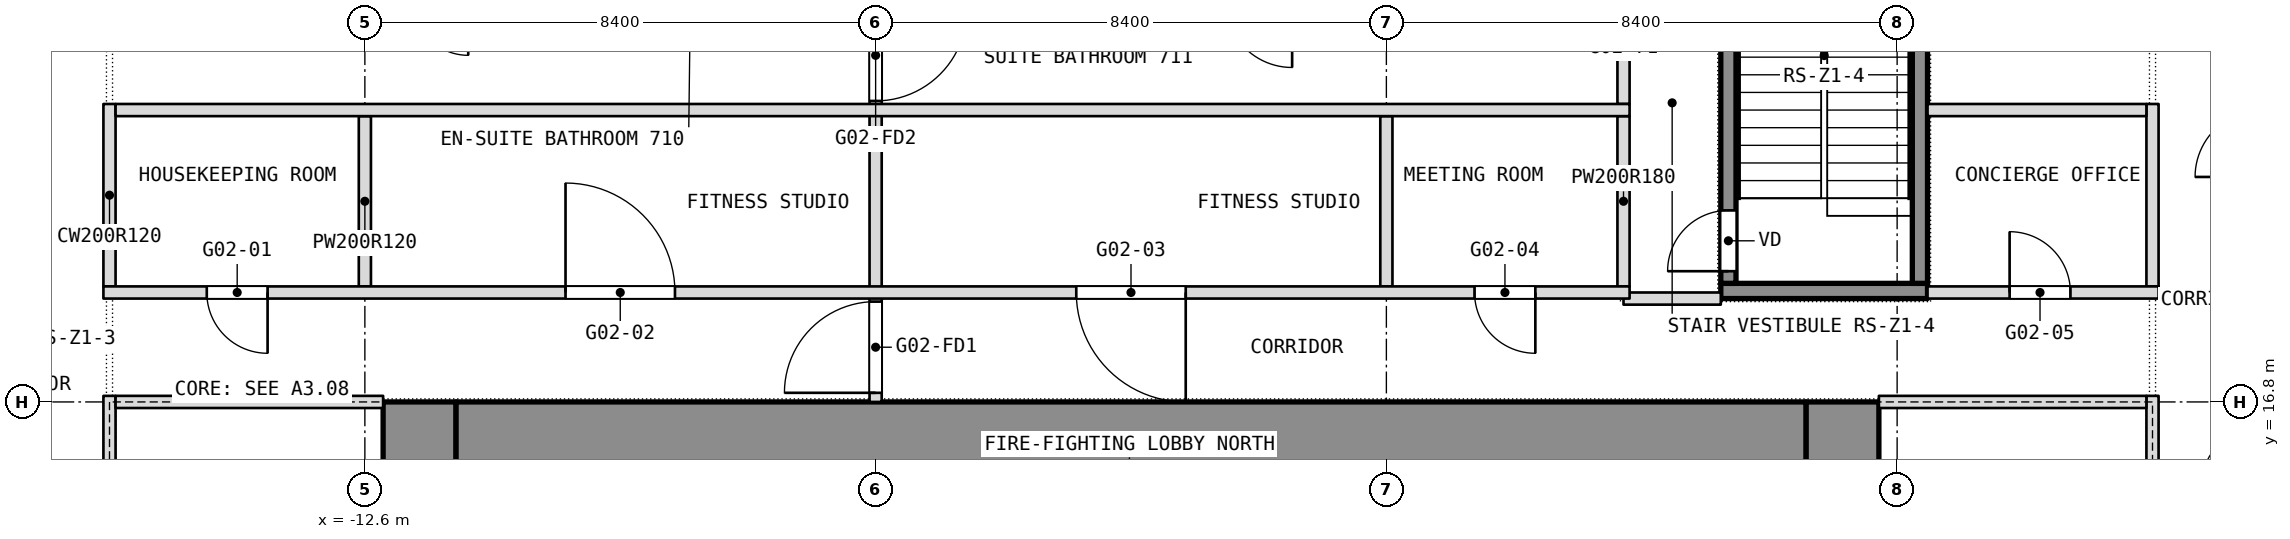
"""IFC4 building model, lengths in metres.
Left out: names, types, materials, properties, quantities, classifications, styles, units other than length and angle.
Written with IfcOpenShell. Run it as: python <this file> out.ifc"""

import sys

from ifc_helpers import new_model, si_unit, direction, frame, frame_2d, origin, place, context, subcontext, project, spatial, rectangle, extrude, element, fill, save


model = new_model("IFC4")
c1 = context("Model", 3, precision=1e-05, world=origin(), true_north=direction((0.0, 1.0)))
c2 = subcontext(c1, "Body", "Model", "MODEL_VIEW")
j1 = project(units=[si_unit("LENGTHUNIT", "METRE"), si_unit("PLANEANGLEUNIT", "RADIAN")], contexts=[c1])
p1 = place(None, origin())
s1 = spatial("IfcSite", under=j1, at=p1, CompositionType="ELEMENT")
p2 = place(p1, origin())
s2 = spatial("IfcBuilding", under=s1, at=p2, CompositionType="ELEMENT")
p3 = place(p2, frame((0.0, 0.0, 40.1)))
s3 = spatial("IfcBuildingStorey", under=s2, at=p3, CompositionType="ELEMENT", Elevation=40.1)
p4 = place(p3, frame((11.7, 0.0, 0.0), z_axis=(0.0, 0.0, 1.0), x_axis=(0.0, 1.0, 0.0)))
e1 = element("IfcWall", 1, at=p4, inside=s3, PredefinedType="SHEAR", context=c2, shape_type="SweptSolid", body=[
    extrude(rectangle(XDim=16.8, YDim=1.2, at=frame_2d((8.4, 0.0))), origin(), (0.0, 0.0, 1.0), 3.6),
])
p5 = place(p4, frame((1.688, 0.0, 0.0)))
e2 = element("IfcOpeningElement", 2, at=p5, cuts=e1, PredefinedType="OPENING", context=c2, shape_type="SweptSolid", body=[
    extrude(rectangle(XDim=0.9, YDim=2.1, at=frame_2d((0.45, 1.05))), frame((0.0, 0.6, 0.0), z_axis=(0.0, -1.0, 0.0), x_axis=(1.0, 0.0, 0.0)), (0.0, 0.0, 1.0), 1.2),
])
p6 = place(p4, frame((4.312, 0.0, 0.0)))
e3 = element("IfcOpeningElement", 3, at=p6, cuts=e1, PredefinedType="OPENING", context=c2, shape_type="SweptSolid", body=[
    extrude(rectangle(XDim=0.9, YDim=2.1, at=frame_2d((0.45, 1.05))), frame((0.0, 0.6, 0.0), z_axis=(0.0, -1.0, 0.0), x_axis=(1.0, 0.0, 0.0)), (0.0, 0.0, 1.0), 1.2),
])
p7 = place(p4, frame((6.825, 0.0, 0.0)))
e4 = element("IfcOpeningElement", 4, at=p7, cuts=e1, PredefinedType="OPENING", context=c2, shape_type="SweptSolid", body=[
    extrude(rectangle(XDim=1.2, YDim=2.1, at=frame_2d((0.6, 1.05))), frame((0.0, 0.6, 0.0), z_axis=(0.0, -1.0, 0.0), x_axis=(1.0, 0.0, 0.0)), (0.0, 0.0, 1.0), 1.2),
])
p8 = place(p4, frame((14.212, 0.0, 0.0)))
e5 = element("IfcOpeningElement", 5, at=p8, cuts=e1, PredefinedType="OPENING", context=c2, shape_type="SweptSolid", body=[
    extrude(rectangle(XDim=0.9, YDim=2.1, at=frame_2d((0.45, 1.05))), frame((0.0, 0.6, 0.0), z_axis=(0.0, -1.0, 0.0), x_axis=(1.0, 0.0, 0.0)), (0.0, 0.0, 1.0), 1.2),
])
p9 = place(p4, frame((11.587, 0.0, 0.0)))
e6 = element("IfcOpeningElement", 6, at=p9, cuts=e1, PredefinedType="OPENING", context=c2, shape_type="SweptSolid", body=[
    extrude(rectangle(XDim=0.9, YDim=2.1, at=frame_2d((0.45, 1.05))), frame((0.0, 0.6, 0.0), z_axis=(0.0, -1.0, 0.0), x_axis=(1.0, 0.0, 0.0)), (0.0, 0.0, 1.0), 1.2),
])
p10 = place(p4, frame((8.775, 0.0, 0.0)))
e7 = element("IfcOpeningElement", 7, at=p10, cuts=e1, PredefinedType="OPENING", context=c2, shape_type="SweptSolid", body=[
    extrude(rectangle(XDim=1.2, YDim=2.1, at=frame_2d((0.6, 1.05))), frame((0.0, 0.6, 0.0), z_axis=(0.0, -1.0, 0.0), x_axis=(1.0, 0.0, 0.0)), (0.0, 0.0, 1.0), 1.2),
])
p11 = place(p3, frame((-11.7, 0.0, 0.0), z_axis=(0.0, 0.0, 1.0), x_axis=(0.0, 1.0, 0.0)))
e8 = element("IfcWall", 8, at=p11, inside=s3, PredefinedType="SHEAR", context=c2, shape_type="SweptSolid", body=[
    extrude(rectangle(XDim=16.8, YDim=1.2, at=frame_2d((8.4, 0.0))), origin(), (0.0, 0.0, 1.0), 3.6),
])
p12 = place(p11, frame((2.3, 0.0, 0.0)))
e9 = element("IfcOpeningElement", 9, at=p12, cuts=e8, PredefinedType="OPENING", context=c2, shape_type="SweptSolid", body=[
    extrude(rectangle(XDim=1.1, YDim=2.1, at=frame_2d((0.55, 1.05))), frame((0.0, 0.6, 0.0), z_axis=(0.0, -1.0, 0.0), x_axis=(1.0, 0.0, 0.0)), (0.0, 0.0, 1.0), 1.2),
])
p13 = place(p11, frame((4.85, 0.0, 0.0)))
e10 = element("IfcOpeningElement", 10, at=p13, cuts=e8, PredefinedType="OPENING", context=c2, shape_type="SweptSolid", body=[
    extrude(rectangle(XDim=1.1, YDim=2.1, at=frame_2d((0.55, 1.05))), frame((0.0, 0.6, 0.0), z_axis=(0.0, -1.0, 0.0), x_axis=(1.0, 0.0, 0.0)), (0.0, 0.0, 1.0), 1.2),
])
p14 = place(p11, frame((6.825, 0.0, 0.0)))
e11 = element("IfcOpeningElement", 11, at=p14, cuts=e8, PredefinedType="OPENING", context=c2, shape_type="SweptSolid", body=[
    extrude(rectangle(XDim=1.2, YDim=2.1, at=frame_2d((0.6, 1.05))), frame((0.0, 0.6, 0.0), z_axis=(0.0, -1.0, 0.0), x_axis=(1.0, 0.0, 0.0)), (0.0, 0.0, 1.0), 1.2),
])
p15 = place(p11, frame((13.4, 0.0, 0.0)))
e12 = element("IfcOpeningElement", 12, at=p15, cuts=e8, PredefinedType="OPENING", context=c2, shape_type="SweptSolid", body=[
    extrude(rectangle(XDim=1.1, YDim=2.1, at=frame_2d((0.55, 1.05))), frame((0.0, 0.6, 0.0), z_axis=(0.0, -1.0, 0.0), x_axis=(1.0, 0.0, 0.0)), (0.0, 0.0, 1.0), 1.2),
])
p16 = place(p11, frame((10.85, 0.0, 0.0)))
e13 = element("IfcOpeningElement", 13, at=p16, cuts=e8, PredefinedType="OPENING", context=c2, shape_type="SweptSolid", body=[
    extrude(rectangle(XDim=1.1, YDim=2.1, at=frame_2d((0.55, 1.05))), frame((0.0, 0.6, 0.0), z_axis=(0.0, -1.0, 0.0), x_axis=(1.0, 0.0, 0.0)), (0.0, 0.0, 1.0), 1.2),
])
p17 = place(p11, frame((8.775, 0.0, 0.0)))
e14 = element("IfcOpeningElement", 14, at=p17, cuts=e8, PredefinedType="OPENING", context=c2, shape_type="SweptSolid", body=[
    extrude(rectangle(XDim=1.2, YDim=2.1, at=frame_2d((0.6, 1.05))), frame((0.0, 0.6, 0.0), z_axis=(0.0, -1.0, 0.0), x_axis=(1.0, 0.0, 0.0)), (0.0, 0.0, 1.0), 1.2),
])
p18 = place(p3, frame((-11.1, 16.2, 0.0), z_axis=(0.0, 0.0, 1.0), x_axis=(1.0, 0.0, 0.0)))
e15 = element("IfcWall", 15, at=p18, inside=s3, PredefinedType="SHEAR", context=c2, shape_type="SweptSolid", body=[
    extrude(rectangle(XDim=22.2, YDim=1.2, at=frame_2d((11.1, 0.0))), origin(), (0.0, 0.0, 1.0), 3.6),
])
p19 = place(p3, frame((16.8, 18.7, 0.0), z_axis=(0.0, 0.0, 1.0), x_axis=(0.0, 1.0, 0.0)))
e16 = element("IfcWall", 16, at=p19, inside=s3, PredefinedType="PARTITIONING", context=c2, shape_type="SweptSolid", body=[
    extrude(rectangle(XDim=3.0, YDim=0.2, at=frame_2d((1.5, 0.0))), origin(), (0.0, 0.0, 1.0), 3.34),
])
p20 = place(p3, frame((8.1, 18.7, 0.0), z_axis=(0.0, 0.0, 1.0), x_axis=(0.0, 1.0, 0.0)))
e17 = element("IfcWall", 17, at=p20, inside=s3, PredefinedType="PARTITIONING", context=c2, shape_type="SweptSolid", body=[
    extrude(rectangle(XDim=2.8, YDim=0.2, at=frame_2d((1.4, 0.0))), origin(), (0.0, 0.0, 1.0), 3.34),
])
p21 = place(p3, frame((8.1, 21.7, 0.0), z_axis=(0.0, 0.0, 1.0), x_axis=(0.0, 1.0, 0.0)))
e18 = element("IfcWall", 18, at=p21, inside=s3, PredefinedType="PARTITIONING", context=c2, shape_type="SweptSolid", body=[
    extrude(rectangle(XDim=2.9, YDim=0.2, at=frame_2d((1.45, 0.0))), origin(), (0.0, 0.0, 1.0), 3.34),
])
p22 = place(p21, frame((1.85, 0.0, 0.0)))
e19 = element("IfcOpeningElement", 19, at=p22, cuts=e18, PredefinedType="OPENING", context=c2, shape_type="SweptSolid", body=[
    extrude(rectangle(XDim=0.9, YDim=2.1, at=frame_2d((0.45, 1.05))), frame((0.0, 0.1, 0.0), z_axis=(0.0, -1.0, 0.0), x_axis=(1.0, 0.0, 0.0)), (0.0, 0.0, 1.0), 0.2),
])
p23 = place(p3, frame((4.2, 18.7, 0.0), z_axis=(0.0, 0.0, 1.0), x_axis=(0.0, 1.0, 0.0)))
e20 = element("IfcWall", 20, at=p23, inside=s3, PredefinedType="PARTITIONING", context=c2, shape_type="SweptSolid", body=[
    extrude(rectangle(XDim=2.8, YDim=0.2, at=frame_2d((1.4, 0.0))), origin(), (0.0, 0.0, 1.0), 3.34),
])
p24 = place(p3, frame((-4.2, 16.8, 0.0), z_axis=(0.0, 0.0, 1.0), x_axis=(0.0, 1.0, 0.0)))
e21 = element("IfcWall", 21, at=p24, inside=s3, PredefinedType="PARTITIONING", context=c2, shape_type="SweptSolid", body=[
    extrude(rectangle(XDim=6.7, YDim=0.2, at=frame_2d((3.35, 0.0))), origin(), (0.0, 0.0, 1.0), 3.34),
])
p25 = place(p24, frame((0.15, 0.0, 0.0)))
e22 = element("IfcOpeningElement", 22, at=p25, cuts=e21, PredefinedType="OPENING", context=c2, shape_type="SweptSolid", body=[
    extrude(rectangle(XDim=1.5, YDim=2.1, at=frame_2d((0.75, 1.05))), frame((0.0, 0.1, 0.0), z_axis=(0.0, -1.0, 0.0), x_axis=(1.0, 0.0, 0.0)), (0.0, 0.0, 1.0), 0.2),
])
p26 = place(p24, frame((4.95, 0.0, 0.0)))
e23 = element("IfcOpeningElement", 23, at=p26, cuts=e21, PredefinedType="OPENING", context=c2, shape_type="SweptSolid", body=[
    extrude(rectangle(XDim=1.5, YDim=2.1, at=frame_2d((0.75, 1.05))), frame((0.0, 0.1, 0.0), z_axis=(0.0, -1.0, 0.0), x_axis=(1.0, 0.0, 0.0)), (0.0, 0.0, 1.0), 0.2),
])
p27 = place(p3, frame((-12.6, 18.7, 0.0), z_axis=(0.0, 0.0, 1.0), x_axis=(0.0, 1.0, 0.0)))
e24 = element("IfcWall", 24, at=p27, inside=s3, PredefinedType="PARTITIONING", context=c2, shape_type="SweptSolid", body=[
    extrude(rectangle(XDim=2.8, YDim=0.2, at=frame_2d((1.4, 0.0))), origin(), (0.0, 0.0, 1.0), 3.34),
])
p28 = place(p3, frame((-16.8, 18.7, 0.0), z_axis=(0.0, 0.0, 1.0), x_axis=(0.0, 1.0, 0.0)))
e25 = element("IfcWall", 25, at=p28, inside=s3, PredefinedType="PARTITIONING", context=c2, shape_type="SweptSolid", body=[
    extrude(rectangle(XDim=3.0, YDim=0.2, at=frame_2d((1.5, 0.0))), origin(), (0.0, 0.0, 1.0), 3.34),
])
p29 = place(p3, frame((8.1, 18.5, 0.0), z_axis=(0.0, 0.0, 1.0), x_axis=(1.0, 0.0, 0.0)))
e26 = element("IfcWall", 26, at=p29, inside=s3, PredefinedType="PARTITIONING", context=c2, shape_type="SweptSolid", body=[
    extrude(rectangle(XDim=1.6, YDim=0.2, at=frame_2d((0.8, 0.0))), origin(), (0.0, 0.0, 1.0), 3.34),
])
p30 = place(p3, frame((-16.9, 18.6, 0.0), z_axis=(0.0, 0.0, 1.0), x_axis=(1.0, 0.0, 0.0)))
e27 = element("IfcWall", 27, at=p30, inside=s3, PredefinedType="PARTITIONING", context=c2, shape_type="SweptSolid", body=[
    extrude(rectangle(XDim=25.1, YDim=0.2, at=frame_2d((12.55, 0.0))), origin(), (0.0, 0.0, 1.0), 3.34),
])
p31 = place(p30, frame((1.7, 0.0, 0.0)))
e28 = element("IfcOpeningElement", 28, at=p31, cuts=e27, PredefinedType="OPENING", context=c2, shape_type="SweptSolid", body=[
    extrude(rectangle(XDim=1.0, YDim=2.1, at=frame_2d((0.5, 1.05))), frame((0.0, 0.1, 0.0), z_axis=(0.0, -1.0, 0.0), x_axis=(1.0, 0.0, 0.0)), (0.0, 0.0, 1.0), 0.2),
])
p32 = place(p30, frame((7.6, 0.0, 0.0)))
e29 = element("IfcOpeningElement", 29, at=p32, cuts=e27, PredefinedType="OPENING", context=c2, shape_type="SweptSolid", body=[
    extrude(rectangle(XDim=1.8, YDim=2.1, at=frame_2d((0.9, 1.05))), frame((0.0, 0.1, 0.0), z_axis=(0.0, -1.0, 0.0), x_axis=(1.0, 0.0, 0.0)), (0.0, 0.0, 1.0), 0.2),
])
p33 = place(p30, frame((16.0, 0.0, 0.0)))
e30 = element("IfcOpeningElement", 30, at=p33, cuts=e27, PredefinedType="OPENING", context=c2, shape_type="SweptSolid", body=[
    extrude(rectangle(XDim=1.8, YDim=2.1, at=frame_2d((0.9, 1.05))), frame((0.0, 0.1, 0.0), z_axis=(0.0, -1.0, 0.0), x_axis=(1.0, 0.0, 0.0)), (0.0, 0.0, 1.0), 0.2),
])
p34 = place(p30, frame((22.55, 0.0, 0.0)))
e31 = element("IfcOpeningElement", 31, at=p34, cuts=e27, PredefinedType="OPENING", context=c2, shape_type="SweptSolid", body=[
    extrude(rectangle(XDim=1.0, YDim=2.1, at=frame_2d((0.5, 1.05))), frame((0.0, 0.1, 0.0), z_axis=(0.0, -1.0, 0.0), x_axis=(1.0, 0.0, 0.0)), (0.0, 0.0, 1.0), 0.2),
])
p35 = place(p3, frame((13.1, 18.6, 0.0), z_axis=(0.0, 0.0, 1.0), x_axis=(1.0, 0.0, 0.0)))
e32 = element("IfcWall", 32, at=p35, inside=s3, PredefinedType="PARTITIONING", context=c2, shape_type="SweptSolid", body=[
    extrude(rectangle(XDim=3.8, YDim=0.2, at=frame_2d((1.9, 0.0))), origin(), (0.0, 0.0, 1.0), 3.34),
])
p36 = place(p35, frame((1.35, 0.0, 0.0)))
e33 = element("IfcOpeningElement", 33, at=p36, cuts=e32, PredefinedType="OPENING", context=c2, shape_type="SweptSolid", body=[
    extrude(rectangle(XDim=1.0, YDim=2.1, at=frame_2d((0.5, 1.05))), frame((0.0, 0.1, 0.0), z_axis=(0.0, -1.0, 0.0), x_axis=(1.0, 0.0, 0.0)), (0.0, 0.0, 1.0), 0.2),
])
p37 = place(p3, frame((-16.7, 21.6, 0.0), z_axis=(0.0, 0.0, 1.0), x_axis=(1.0, 0.0, 0.0)))
e34 = element("IfcWall", 34, at=p37, inside=s3, PredefinedType="PARTITIONING", context=c2, shape_type="SweptSolid", body=[
    extrude(rectangle(XDim=24.9, YDim=0.2, at=frame_2d((12.45, 0.0))), origin(), (0.0, 0.0, 1.0), 3.34),
])
p38 = place(p3, frame((13.1, 21.6, 0.0), z_axis=(0.0, 0.0, 1.0), x_axis=(1.0, 0.0, 0.0)))
e35 = element("IfcWall", 35, at=p38, inside=s3, PredefinedType="PARTITIONING", context=c2, shape_type="SweptSolid", body=[
    extrude(rectangle(XDim=3.6, YDim=0.2, at=frame_2d((1.8, 0.0))), origin(), (0.0, 0.0, 1.0), 3.34),
])
p39 = place(p3, frame((-16.8, -0.1, 0.0), z_axis=(0.0, 0.0, 1.0), x_axis=(0.0, 1.0, 0.0)))
e36 = element("IfcWall", 36, at=p39, inside=s3, PredefinedType="PARTITIONING", context=c2, shape_type="SweptSolid", body=[
    extrude(rectangle(XDim=17.0, YDim=0.2, at=frame_2d((8.5, 0.0))), origin(), (0.0, 0.0, 1.0), 3.34),
])
p40 = place(p39, frame((2.2, 0.0, 0.0)))
e37 = element("IfcOpeningElement", 37, at=p40, cuts=e36, PredefinedType="OPENING", context=c2, shape_type="SweptSolid", body=[
    extrude(rectangle(XDim=1.8, YDim=2.1, at=frame_2d((0.9, 1.05))), frame((0.0, 0.1, 0.0), z_axis=(0.0, -1.0, 0.0), x_axis=(1.0, 0.0, 0.0)), (0.0, 0.0, 1.0), 0.2),
])
p41 = place(p39, frame((7.2, 0.0, 0.0)))
e38 = element("IfcOpeningElement", 38, at=p41, cuts=e36, PredefinedType="OPENING", context=c2, shape_type="SweptSolid", body=[
    extrude(rectangle(XDim=1.8, YDim=2.1, at=frame_2d((0.9, 1.05))), frame((0.0, 0.1, 0.0), z_axis=(0.0, -1.0, 0.0), x_axis=(1.0, 0.0, 0.0)), (0.0, 0.0, 1.0), 0.2),
])
p42 = place(p3, frame((-16.7, 16.8, 0.0), z_axis=(0.0, 0.0, 1.0), x_axis=(1.0, 0.0, 0.0)))
e39 = element("IfcWall", 39, at=p42, inside=s3, PredefinedType="PARTITIONING", context=c2, shape_type="SweptSolid", body=[
    extrude(rectangle(XDim=4.4, YDim=0.2, at=frame_2d((2.2, 0.0))), origin(), (0.0, 0.0, 1.0), 2.84),
])
p43 = place(p3, frame((16.8, -0.1, 0.0), z_axis=(0.0, 0.0, 1.0), x_axis=(0.0, 1.0, 0.0)))
e40 = element("IfcWall", 40, at=p43, inside=s3, PredefinedType="PARTITIONING", context=c2, shape_type="SweptSolid", body=[
    extrude(rectangle(XDim=17.0, YDim=0.2, at=frame_2d((8.5, 0.0))), origin(), (0.0, 0.0, 1.0), 3.34),
])
p44 = place(p43, frame((2.2, 0.0, 0.0)))
e41 = element("IfcOpeningElement", 41, at=p44, cuts=e40, PredefinedType="OPENING", context=c2, shape_type="SweptSolid", body=[
    extrude(rectangle(XDim=1.8, YDim=2.1, at=frame_2d((0.9, 1.05))), frame((0.0, 0.1, 0.0), z_axis=(0.0, -1.0, 0.0), x_axis=(1.0, 0.0, 0.0)), (0.0, 0.0, 1.0), 0.2),
])
p45 = place(p43, frame((13.0, 0.0, 0.0)))
e42 = element("IfcOpeningElement", 42, at=p45, cuts=e40, PredefinedType="OPENING", context=c2, shape_type="SweptSolid", body=[
    extrude(rectangle(XDim=1.8, YDim=2.1, at=frame_2d((0.9, 1.05))), frame((0.0, 0.1, 0.0), z_axis=(0.0, -1.0, 0.0), x_axis=(1.0, 0.0, 0.0)), (0.0, 0.0, 1.0), 0.2),
])
p46 = place(p3, frame((12.3, 16.8, 0.0), z_axis=(0.0, 0.0, 1.0), x_axis=(1.0, 0.0, 0.0)))
e43 = element("IfcWall", 43, at=p46, inside=s3, PredefinedType="PARTITIONING", context=c2, shape_type="SweptSolid", body=[
    extrude(rectangle(XDim=4.4, YDim=0.2, at=frame_2d((2.2, 0.0))), origin(), (0.0, 0.0, 1.0), 2.84),
])
p47 = place(p3, frame((9.7, 18.625, 0.1), z_axis=(0.0, 0.0, 1.0), x_axis=(1.0, 0.0, 0.0)))
e44 = element("IfcWall", 44, at=p47, inside=s3, PredefinedType="SHEAR", context=c2, shape_type="SweptSolid", body=[
    extrude(rectangle(XDim=3.4, YDim=0.25, at=frame_2d((1.7, 0.0))), origin(), (0.0, 0.0, 1.0), 3.6),
])
p48 = place(p3, frame((9.825, 18.75, 0.1), z_axis=(0.0, 0.0, 1.0), x_axis=(0.0, 1.0, 0.0)))
e45 = element("IfcWall", 45, at=p48, inside=s3, PredefinedType="SHEAR", context=c2, shape_type="SweptSolid", body=[
    extrude(rectangle(XDim=5.7, YDim=0.25, at=frame_2d((2.85, 0.0))), origin(), (0.0, 0.0, 1.0), 3.6),
])
p49 = place(p48, frame((0.2, 0.0, 0.0)))
e46 = element("IfcOpeningElement", 46, at=p49, cuts=e45, PredefinedType="OPENING", context=c2, shape_type="SweptSolid", body=[
    extrude(rectangle(XDim=1.0, YDim=2.1, at=frame_2d((0.5, 1.05))), frame((0.0, 0.125, 0.0), z_axis=(0.0, -1.0, 0.0), x_axis=(1.0, 0.0, 0.0)), (0.0, 0.0, 1.0), 0.25),
])
p50 = place(p3, frame((12.975, 18.75, 0.1), z_axis=(0.0, 0.0, 1.0), x_axis=(0.0, 1.0, 0.0)))
e47 = element("IfcWall", 47, at=p50, inside=s3, PredefinedType="SHEAR", context=c2, shape_type="SweptSolid", body=[
    extrude(rectangle(XDim=5.7, YDim=0.25, at=frame_2d((2.85, 0.0))), origin(), (0.0, 0.0, 1.0), 3.6),
])
p51 = place(p31, origin())
e48 = element("IfcDoor", 48, at=p51, inside=s3, OperationType="SINGLE_SWING_RIGHT", PredefinedType="DOOR", context=c2, shape_type="SweptSolid", body=[
    extrude(rectangle(XDim=1.0, YDim=2.1, at=frame_2d((0.5, 1.05))), frame((0.0, 0.025, 0.0), z_axis=(0.0, -1.0, 0.0), x_axis=(1.0, 0.0, 0.0)), (0.0, 0.0, 1.0), 0.05),
])
fill(e28, e48)
p52 = place(p32, origin())
e49 = element("IfcDoor", 49, at=p52, inside=s3, OperationType="DOUBLE_DOOR_SINGLE_SWING", PredefinedType="DOOR", context=c2, shape_type="SweptSolid", body=[
    extrude(rectangle(XDim=1.8, YDim=2.1, at=frame_2d((0.9, 1.05))), frame((0.0, 0.025, 0.0), z_axis=(0.0, -1.0, 0.0), x_axis=(1.0, 0.0, 0.0)), (0.0, 0.0, 1.0), 0.05),
])
fill(e29, e49)
p53 = place(p33, origin())
e50 = element("IfcDoor", 50, at=p53, inside=s3, OperationType="DOUBLE_DOOR_SINGLE_SWING", PredefinedType="DOOR", context=c2, shape_type="SweptSolid", body=[
    extrude(rectangle(XDim=1.8, YDim=2.1, at=frame_2d((0.9, 1.05))), frame((0.0, 0.025, 0.0), z_axis=(0.0, -1.0, 0.0), x_axis=(1.0, 0.0, 0.0)), (0.0, 0.0, 1.0), 0.05),
])
fill(e30, e50)
p54 = place(p34, origin())
e51 = element("IfcDoor", 51, at=p54, inside=s3, OperationType="SINGLE_SWING_RIGHT", PredefinedType="DOOR", context=c2, shape_type="SweptSolid", body=[
    extrude(rectangle(XDim=1.0, YDim=2.1, at=frame_2d((0.5, 1.05))), frame((0.0, 0.025, 0.0), z_axis=(0.0, -1.0, 0.0), x_axis=(1.0, 0.0, 0.0)), (0.0, 0.0, 1.0), 0.05),
])
fill(e31, e51)
p55 = place(p36, origin())
e52 = element("IfcDoor", 52, at=p55, inside=s3, OperationType="SINGLE_SWING_LEFT", PredefinedType="DOOR", context=c2, shape_type="SweptSolid", body=[
    extrude(rectangle(XDim=1.0, YDim=2.1, at=frame_2d((0.5, 1.05))), frame((0.0, 0.025, 0.0), z_axis=(0.0, -1.0, 0.0), x_axis=(1.0, 0.0, 0.0)), (0.0, 0.0, 1.0), 0.05),
])
fill(e33, e52)
p56 = place(p49, origin())
e53 = element("IfcDoor", 53, at=p56, inside=s3, OperationType="SINGLE_SWING_LEFT", PredefinedType="DOOR", context=c2, shape_type="SweptSolid", body=[
    extrude(rectangle(XDim=1.0, YDim=2.1, at=frame_2d((0.5, 1.05))), frame((0.0, 0.025, 0.0), z_axis=(0.0, -1.0, 0.0), x_axis=(1.0, 0.0, 0.0)), (0.0, 0.0, 1.0), 0.05),
])
fill(e46, e53)
p57 = place(p25, origin())
e54 = element("IfcDoor", 54, at=p57, inside=s3, OperationType="DOUBLE_DOOR_DOUBLE_SWING", PredefinedType="DOOR", context=c2, shape_type="SweptSolid", body=[
    extrude(rectangle(XDim=1.5, YDim=2.1, at=frame_2d((0.75, 1.05))), frame((0.0, 0.025, 0.0), z_axis=(0.0, -1.0, 0.0), x_axis=(1.0, 0.0, 0.0)), (0.0, 0.0, 1.0), 0.05),
])
fill(e22, e54)
p58 = place(p26, origin())
e55 = element("IfcDoor", 55, at=p58, inside=s3, OperationType="DOUBLE_DOOR_DOUBLE_SWING", PredefinedType="DOOR", context=c2, shape_type="SweptSolid", body=[
    extrude(rectangle(XDim=1.5, YDim=2.1, at=frame_2d((0.75, 1.05))), frame((0.0, 0.025, 0.0), z_axis=(0.0, -1.0, 0.0), x_axis=(1.0, 0.0, 0.0)), (0.0, 0.0, 1.0), 0.05),
])
fill(e23, e55)
save(model, sys.argv[1])
